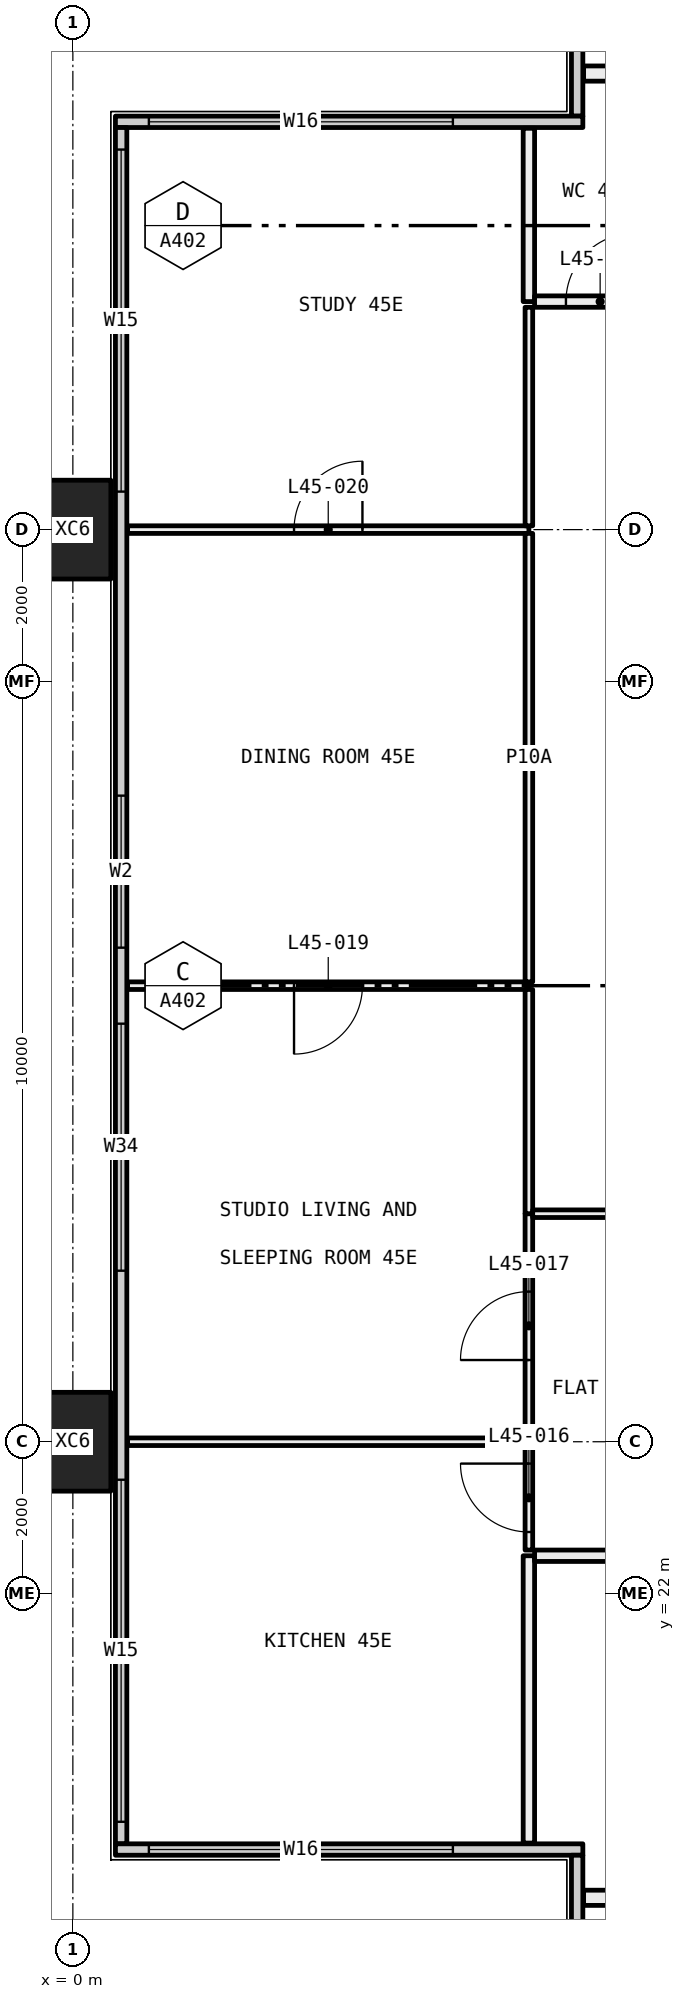
"""IFC4 building model, lengths in metres.
Left out: names, types, materials, properties, quantities, classifications, styles, units other than length and angle.
Written with IfcOpenShell. Run it as: python <this file> out.ifc"""

import sys

from ifc_helpers import new_model, si_unit, direction, frame, frame_2d, origin, origin_2d, place, context, subcontext, project, spatial, rectangle, hollow_rectangle, extrude, element, fill, save


model = new_model("IFC4")
c1 = context("Model", 3, precision=1e-05, world=origin(), true_north=direction((0.0, 1.0)))
c2 = subcontext(c1, "Body", "Model", "MODEL_VIEW")
j1 = project(units=[si_unit("LENGTHUNIT", "METRE"), si_unit("PLANEANGLEUNIT", "RADIAN")], contexts=[c1])
p1 = place(None, origin())
s1 = spatial("IfcSite", under=j1, at=p1, CompositionType="ELEMENT")
p2 = place(p1, origin())
s2 = spatial("IfcBuilding", under=s1, at=p2, CompositionType="ELEMENT")
p3 = place(p2, frame((0.0, 0.0, 172.05)))
s3 = spatial("IfcBuildingStorey", under=s2, at=p3, CompositionType="ELEMENT", Elevation=172.05)
for number, where, z_axis, x_axis in (
    (1, (0.0, 24.0, -0.4), (0.0, 0.0, 1.0), (0.0, 1.0, 0.0)),
    (2, (0.0, 36.0, -0.4), (0.0, 0.0, 1.0), (0.0, 1.0, 0.0)),
):
    element("IfcColumn", number, at=place(p3, frame(where, z_axis=z_axis, x_axis=x_axis)), inside=s3, PredefinedType="COLUMN", context=c2, shape_type="SweptSolid", body=[
        extrude(hollow_rectangle(XDim=1.3, YDim=1.0, WallThickness=0.05, at=origin_2d()), origin(), (0.0, 0.0, 1.0), 3.45),
    ])
p4 = place(p3, frame((6.635, 41.44, 0.0), z_axis=(0.0, 0.0, 1.0), x_axis=(0.0, 1.0, 0.0)))
e3 = element("IfcWall", 3, at=p4, inside=s3, PredefinedType="ELEMENTEDWALL", context=c2, shape_type="SweptSolid", body=[
    extrude(rectangle(XDim=5.85, YDim=0.15, at=frame_2d((2.925, 0.0))), origin(), (0.0, 0.0, 1.0), 3.05),
])
p5 = place(p4, frame((1.56, 0.0, 0.45)))
e4 = element("IfcOpeningElement", 4, at=p5, cuts=e3, PredefinedType="OPENING", context=c2, shape_type="SweptSolid", body=[
    extrude(rectangle(XDim=4.0, YDim=2.55, at=frame_2d((2.0, 1.275))), frame((0.0, 0.085, 0.0), z_axis=(0.0, -1.0, 0.0), x_axis=(1.0, 0.0, 0.0)), (0.0, 0.0, 1.0), 0.17),
])
p6 = place(p3, frame((0.56, 41.365, 0.0), z_axis=(0.0, 0.0, 1.0), x_axis=(1.0, 0.0, 0.0)))
e5 = element("IfcWall", 5, at=p6, inside=s3, PredefinedType="ELEMENTEDWALL", context=c2, shape_type="SweptSolid", body=[
    extrude(rectangle(XDim=6.15, YDim=0.15, at=frame_2d((3.075, 0.0))), origin(), (0.0, 0.0, 1.0), 3.05),
])
p7 = place(p6, frame((0.44, 0.0, 0.45)))
e6 = element("IfcOpeningElement", 6, at=p7, cuts=e5, PredefinedType="OPENING", context=c2, shape_type="SweptSolid", body=[
    extrude(rectangle(XDim=4.0, YDim=2.55, at=frame_2d((2.0, 1.275))), frame((0.0, 0.085, 0.0), z_axis=(0.0, -1.0, 0.0), x_axis=(1.0, 0.0, 0.0)), (0.0, 0.0, 1.0), 0.17),
])
p8 = place(p3, frame((0.635, 18.71, 0.0), z_axis=(0.0, 0.0, 1.0), x_axis=(0.0, 1.0, 0.0)))
e7 = element("IfcWall", 7, at=p8, inside=s3, PredefinedType="ELEMENTEDWALL", context=c2, shape_type="SweptSolid", body=[
    extrude(rectangle(XDim=22.58, YDim=0.15, at=frame_2d((11.29, 0.0))), origin(), (0.0, 0.0, 1.0), 3.05),
])
p9 = place(p8, frame((0.29, 0.0, 0.45)))
e8 = element("IfcOpeningElement", 8, at=p9, cuts=e7, PredefinedType="OPENING", context=c2, shape_type="SweptSolid", body=[
    extrude(rectangle(XDim=4.5, YDim=2.55, at=frame_2d((2.25, 1.275))), frame((0.0, 0.085, 0.0), z_axis=(0.0, -1.0, 0.0), x_axis=(1.0, 0.0, 0.0)), (0.0, 0.0, 1.0), 0.17),
])
p10 = place(p8, frame((7.54, 0.0, 0.45)))
e9 = element("IfcOpeningElement", 9, at=p10, cuts=e7, PredefinedType="OPENING", context=c2, shape_type="SweptSolid", body=[
    extrude(rectangle(XDim=3.25, YDim=2.55, at=frame_2d((1.625, 1.275))), frame((0.0, 0.085, 0.0), z_axis=(0.0, -1.0, 0.0), x_axis=(1.0, 0.0, 0.0)), (0.0, 0.0, 1.0), 0.17),
])
p11 = place(p8, frame((11.79, 0.0, 0.45)))
e10 = element("IfcOpeningElement", 10, at=p11, cuts=e7, PredefinedType="OPENING", context=c2, shape_type="SweptSolid", body=[
    extrude(rectangle(XDim=2.0, YDim=2.55, at=frame_2d((1.0, 1.275))), frame((0.0, 0.085, 0.0), z_axis=(0.0, -1.0, 0.0), x_axis=(1.0, 0.0, 0.0)), (0.0, 0.0, 1.0), 0.17),
])
p12 = place(p8, frame((17.79, 0.0, 0.45)))
e11 = element("IfcOpeningElement", 11, at=p12, cuts=e7, PredefinedType="OPENING", context=c2, shape_type="SweptSolid", body=[
    extrude(rectangle(XDim=4.5, YDim=2.55, at=frame_2d((2.25, 1.275))), frame((0.0, 0.085, 0.0), z_axis=(0.0, -1.0, 0.0), x_axis=(1.0, 0.0, 0.0)), (0.0, 0.0, 1.0), 0.17),
])
p13 = place(p3, frame((0.56, 18.635, 0.0), z_axis=(0.0, 0.0, 1.0), x_axis=(1.0, 0.0, 0.0)))
e12 = element("IfcWall", 12, at=p13, inside=s3, PredefinedType="ELEMENTEDWALL", context=c2, shape_type="SweptSolid", body=[
    extrude(rectangle(XDim=6.15, YDim=0.15, at=frame_2d((3.075, 0.0))), origin(), (0.0, 0.0, 1.0), 3.05),
])
p14 = place(p13, frame((0.44, 0.0, 0.45)))
e13 = element("IfcOpeningElement", 13, at=p14, cuts=e12, PredefinedType="OPENING", context=c2, shape_type="SweptSolid", body=[
    extrude(rectangle(XDim=4.0, YDim=2.55, at=frame_2d((2.0, 1.275))), frame((0.0, 0.085, 0.0), z_axis=(0.0, -1.0, 0.0), x_axis=(1.0, 0.0, 0.0)), (0.0, 0.0, 1.0), 0.17),
])
p15 = place(p3, frame((6.635, 12.71, 0.0), z_axis=(0.0, 0.0, 1.0), x_axis=(0.0, 1.0, 0.0)))
e14 = element("IfcWall", 14, at=p15, inside=s3, PredefinedType="ELEMENTEDWALL", context=c2, shape_type="SweptSolid", body=[
    extrude(rectangle(XDim=5.85, YDim=0.15, at=frame_2d((2.925, 0.0))), origin(), (0.0, 0.0, 1.0), 3.05),
])
p16 = place(p15, frame((0.29, 0.0, 0.45)))
e15 = element("IfcOpeningElement", 15, at=p16, cuts=e14, PredefinedType="OPENING", context=c2, shape_type="SweptSolid", body=[
    extrude(rectangle(XDim=4.0, YDim=2.55, at=frame_2d((2.0, 1.275))), frame((0.0, 0.085, 0.0), z_axis=(0.0, -1.0, 0.0), x_axis=(1.0, 0.0, 0.0)), (0.0, 0.0, 1.0), 0.17),
])
p17 = place(p3, frame((10.1, 18.0, 0.0), z_axis=(0.0, 0.0, 1.0), x_axis=(-1.0, 0.0, 0.0)))
e16 = element("IfcWall", 16, at=p17, inside=s3, PredefinedType="PARTITIONING", context=c2, shape_type="SweptSolid", body=[
    extrude(rectangle(XDim=3.38, YDim=0.2, at=frame_2d((1.69, 0.0))), origin(), (0.0, 0.0, 1.0), 3.05),
])
p18 = place(p3, frame((6.72, 42.0, 0.0), z_axis=(0.0, 0.0, 1.0), x_axis=(1.0, 0.0, 0.0)))
e17 = element("IfcWall", 17, at=p18, inside=s3, PredefinedType="PARTITIONING", context=c2, shape_type="SweptSolid", body=[
    extrude(rectangle(XDim=1.08, YDim=0.2, at=frame_2d((0.54, 0.0))), origin(), (0.0, 0.0, 1.0), 3.05),
])
p19 = place(p3, frame((6.0, 24.0, 0.0), z_axis=(0.0, 0.0, 1.0), x_axis=(-1.0, 0.0, 0.0)))
e18 = element("IfcWall", 18, at=p19, inside=s3, PredefinedType="PARTITIONING", context=c2, shape_type="SweptSolid", body=[
    extrude(rectangle(XDim=5.28, YDim=0.1, at=frame_2d((2.64, 0.0))), origin(), (0.0, 0.0, 1.0), 2.45),
])
p20 = place(p3, frame((6.0, 18.72, 0.0), z_axis=(0.0, 0.0, 1.0), x_axis=(0.0, 1.0, 0.0)))
e19 = element("IfcWall", 19, at=p20, inside=s3, PredefinedType="PARTITIONING", context=c2, shape_type="SweptSolid", body=[
    extrude(rectangle(XDim=3.78, YDim=0.15, at=frame_2d((1.89, 0.0))), origin(), (0.0, 0.0, 1.0), 3.05),
])
p21 = place(p3, frame((6.0, 22.575, 0.0), z_axis=(0.0, 0.0, 1.0), x_axis=(0.0, 1.0, 0.0)))
e20 = element("IfcWall", 20, at=p21, inside=s3, PredefinedType="PARTITIONING", context=c2, shape_type="SweptSolid", body=[
    extrude(rectangle(XDim=1.375, YDim=0.1, at=frame_2d((0.688, 0.0))), origin(), (0.0, 0.0, 1.0), 2.45),
])
p22 = place(p21, frame((0.238, 0.0, 0.0)))
e21 = element("IfcOpeningElement", 21, at=p22, cuts=e20, PredefinedType="OPENING", context=c2, shape_type="SweptSolid", body=[
    extrude(rectangle(XDim=0.9, YDim=2.1, at=frame_2d((0.45, 1.05))), frame((0.0, 0.06, 0.0), z_axis=(0.0, -1.0, 0.0), x_axis=(1.0, 0.0, 0.0)), (0.0, 0.0, 1.0), 0.12),
])
p23 = place(p3, frame((6.0, 30.0, 0.0), z_axis=(0.0, 0.0, 1.0), x_axis=(-1.0, 0.0, 0.0)))
e22 = element("IfcWall", 22, at=p23, inside=s3, PredefinedType="PARTITIONING", context=c2, shape_type="SweptSolid", body=[
    extrude(rectangle(XDim=5.28, YDim=0.1, at=frame_2d((2.64, 0.0))), origin(), (0.0, 0.0, 1.0), 3.05),
])
p24 = place(p23, frame((2.19, 0.0, 0.0)))
e23 = element("IfcOpeningElement", 23, at=p24, cuts=e22, PredefinedType="OPENING", context=c2, shape_type="SweptSolid", body=[
    extrude(rectangle(XDim=0.9, YDim=2.1, at=frame_2d((0.45, 1.05))), frame((0.0, 0.06, 0.0), z_axis=(0.0, -1.0, 0.0), x_axis=(1.0, 0.0, 0.0)), (0.0, 0.0, 1.0), 0.12),
])
p25 = place(p3, frame((6.0, 24.05, 0.0), z_axis=(0.0, 0.0, 1.0), x_axis=(0.0, 1.0, 0.0)))
e24 = element("IfcWall", 24, at=p25, inside=s3, PredefinedType="PARTITIONING", context=c2, shape_type="SweptSolid", body=[
    extrude(rectangle(XDim=2.95, YDim=0.1, at=frame_2d((1.475, 0.0))), origin(), (0.0, 0.0, 1.0), 2.45),
])
p26 = place(p25, frame((1.025, 0.0, 0.0)))
e25 = element("IfcOpeningElement", 25, at=p26, cuts=e24, PredefinedType="OPENING", context=c2, shape_type="SweptSolid", body=[
    extrude(rectangle(XDim=0.9, YDim=2.1, at=frame_2d((0.45, 1.05))), frame((0.0, 0.06, 0.0), z_axis=(0.0, -1.0, 0.0), x_axis=(1.0, 0.0, 0.0)), (0.0, 0.0, 1.0), 0.12),
])
p27 = place(p3, frame((6.0, 27.0, 0.0), z_axis=(0.0, 0.0, 1.0), x_axis=(0.0, 1.0, 0.0)))
e26 = element("IfcWall", 26, at=p27, inside=s3, PredefinedType="PARTITIONING", context=c2, shape_type="SweptSolid", body=[
    extrude(rectangle(XDim=2.95, YDim=0.1, at=frame_2d((1.475, 0.0))), origin(), (0.0, 0.0, 1.0), 3.05),
])
p28 = place(p3, frame((6.0, 36.0, 0.0), z_axis=(0.0, 0.0, 1.0), x_axis=(-1.0, 0.0, 0.0)))
e27 = element("IfcWall", 27, at=p28, inside=s3, PredefinedType="PARTITIONING", context=c2, shape_type="SweptSolid", body=[
    extrude(rectangle(XDim=5.28, YDim=0.1, at=frame_2d((2.64, 0.0))), origin(), (0.0, 0.0, 1.0), 2.45),
])
p29 = place(p28, frame((2.19, 0.0, 0.0)))
e28 = element("IfcOpeningElement", 28, at=p29, cuts=e27, PredefinedType="OPENING", context=c2, shape_type="SweptSolid", body=[
    extrude(rectangle(XDim=0.9, YDim=2.1, at=frame_2d((0.45, 1.05))), frame((0.0, 0.06, 0.0), z_axis=(0.0, -1.0, 0.0), x_axis=(1.0, 0.0, 0.0)), (0.0, 0.0, 1.0), 0.12),
])
p30 = place(p3, frame((6.0, 30.05, 0.0), z_axis=(0.0, 0.0, 1.0), x_axis=(0.0, 1.0, 0.0)))
e29 = element("IfcWall", 29, at=p30, inside=s3, PredefinedType="PARTITIONING", context=c2, shape_type="SweptSolid", body=[
    extrude(rectangle(XDim=5.9, YDim=0.1, at=frame_2d((2.95, 0.0))), origin(), (0.0, 0.0, 1.0), 2.45),
])
p31 = place(p3, frame((6.0, 36.05, 0.0), z_axis=(0.0, 0.0, 1.0), x_axis=(0.0, 1.0, 0.0)))
e30 = element("IfcWall", 30, at=p31, inside=s3, PredefinedType="PARTITIONING", context=c2, shape_type="SweptSolid", body=[
    extrude(rectangle(XDim=2.875, YDim=0.1, at=frame_2d((1.438, 0.0))), origin(), (0.0, 0.0, 1.0), 2.45),
])
p32 = place(p3, frame((6.0, 39.0, 0.0), z_axis=(0.0, 0.0, 1.0), x_axis=(0.0, 1.0, 0.0)))
e31 = element("IfcWall", 31, at=p32, inside=s3, PredefinedType="PARTITIONING", context=c2, shape_type="SweptSolid", body=[
    extrude(rectangle(XDim=2.28, YDim=0.15, at=frame_2d((1.14, 0.0))), origin(), (0.0, 0.0, 1.0), 3.05),
])
p33 = place(p3, frame((10.0, 22.5, 0.0), z_axis=(0.0, 0.0, 1.0), x_axis=(-1.0, 0.0, 0.0)))
e32 = element("IfcWall", 32, at=p33, inside=s3, PredefinedType="PARTITIONING", context=c2, shape_type="SweptSolid", body=[
    extrude(rectangle(XDim=3.925, YDim=0.15, at=frame_2d((1.962, 0.0))), origin(), (0.0, 0.0, 1.0), 3.05),
])
p34 = place(p33, frame((1.512, 0.0, 0.0)))
e33 = element("IfcOpeningElement", 33, at=p34, cuts=e32, PredefinedType="OPENING", context=c2, shape_type="SweptSolid", body=[
    extrude(rectangle(XDim=0.9, YDim=2.1, at=frame_2d((0.45, 1.05))), frame((0.0, 0.085, 0.0), z_axis=(0.0, -1.0, 0.0), x_axis=(1.0, 0.0, 0.0)), (0.0, 0.0, 1.0), 0.17),
])
p35 = place(p3, frame((10.0, 27.0, 0.0), z_axis=(0.0, 0.0, 1.0), x_axis=(-1.0, 0.0, 0.0)))
e34 = element("IfcWall", 34, at=p35, inside=s3, PredefinedType="PARTITIONING", context=c2, shape_type="SweptSolid", body=[
    extrude(rectangle(XDim=3.95, YDim=0.1, at=frame_2d((1.975, 0.0))), origin(), (0.0, 0.0, 1.0), 3.05),
])
p36 = place(p35, frame((1.525, 0.0, 0.0)))
e35 = element("IfcOpeningElement", 35, at=p36, cuts=e34, PredefinedType="OPENING", context=c2, shape_type="SweptSolid", body=[
    extrude(rectangle(XDim=0.9, YDim=2.1, at=frame_2d((0.45, 1.05))), frame((0.0, 0.06, 0.0), z_axis=(0.0, -1.0, 0.0), x_axis=(1.0, 0.0, 0.0)), (0.0, 0.0, 1.0), 0.12),
])
p37 = place(p3, frame((7.8, 39.0, 0.0), z_axis=(0.0, 0.0, 1.0), x_axis=(-1.0, 0.0, 0.0)))
e36 = element("IfcWall", 36, at=p37, inside=s3, PredefinedType="PARTITIONING", context=c2, shape_type="SweptSolid", body=[
    extrude(rectangle(XDim=1.725, YDim=0.15, at=frame_2d((0.863, 0.0))), origin(), (0.0, 0.0, 1.0), 3.05),
])
p38 = place(p37, frame((0.413, 0.0, 0.0)))
e37 = element("IfcOpeningElement", 37, at=p38, cuts=e36, PredefinedType="OPENING", context=c2, shape_type="SweptSolid", body=[
    extrude(rectangle(XDim=0.9, YDim=2.1, at=frame_2d((0.45, 1.05))), frame((0.0, 0.085, 0.0), z_axis=(0.0, -1.0, 0.0), x_axis=(1.0, 0.0, 0.0)), (0.0, 0.0, 1.0), 0.17),
])
p39 = place(p7, origin())
e38 = element("IfcWindow", 38, at=p39, inside=s3, PartitioningType="SINGLE_PANEL", PredefinedType="WINDOW", context=c2, shape_type="SweptSolid", body=[
    extrude(rectangle(XDim=4.0, YDim=2.55, at=frame_2d((2.0, 1.275))), frame((0.0, 0.03, 0.0), z_axis=(0.0, -1.0, 0.0), x_axis=(1.0, 0.0, 0.0)), (0.0, 0.0, 1.0), 0.06),
])
fill(e6, e38)
p40 = place(p9, origin())
e39 = element("IfcWindow", 39, at=p40, inside=s3, PartitioningType="SINGLE_PANEL", PredefinedType="WINDOW", context=c2, shape_type="SweptSolid", body=[
    extrude(rectangle(XDim=4.5, YDim=2.55, at=frame_2d((2.25, 1.275))), frame((0.0, 0.03, 0.0), z_axis=(0.0, -1.0, 0.0), x_axis=(1.0, 0.0, 0.0)), (0.0, 0.0, 1.0), 0.06),
])
fill(e8, e39)
p41 = place(p10, origin())
e40 = element("IfcWindow", 40, at=p41, inside=s3, PartitioningType="SINGLE_PANEL", PredefinedType="WINDOW", context=c2, shape_type="SweptSolid", body=[
    extrude(rectangle(XDim=3.25, YDim=2.55, at=frame_2d((1.625, 1.275))), frame((0.0, 0.03, 0.0), z_axis=(0.0, -1.0, 0.0), x_axis=(1.0, 0.0, 0.0)), (0.0, 0.0, 1.0), 0.06),
])
fill(e9, e40)
p42 = place(p11, origin())
e41 = element("IfcWindow", 41, at=p42, inside=s3, PartitioningType="SINGLE_PANEL", PredefinedType="WINDOW", context=c2, shape_type="SweptSolid", body=[
    extrude(rectangle(XDim=2.0, YDim=2.55, at=frame_2d((1.0, 1.275))), frame((0.0, 0.03, 0.0), z_axis=(0.0, -1.0, 0.0), x_axis=(1.0, 0.0, 0.0)), (0.0, 0.0, 1.0), 0.06),
])
fill(e10, e41)
p43 = place(p12, origin())
e42 = element("IfcWindow", 42, at=p43, inside=s3, PartitioningType="SINGLE_PANEL", PredefinedType="WINDOW", context=c2, shape_type="SweptSolid", body=[
    extrude(rectangle(XDim=4.5, YDim=2.55, at=frame_2d((2.25, 1.275))), frame((0.0, 0.03, 0.0), z_axis=(0.0, -1.0, 0.0), x_axis=(1.0, 0.0, 0.0)), (0.0, 0.0, 1.0), 0.06),
])
fill(e11, e42)
p44 = place(p14, origin())
e43 = element("IfcWindow", 43, at=p44, inside=s3, PartitioningType="SINGLE_PANEL", PredefinedType="WINDOW", context=c2, shape_type="SweptSolid", body=[
    extrude(rectangle(XDim=4.0, YDim=2.55, at=frame_2d((2.0, 1.275))), frame((0.0, 0.03, 0.0), z_axis=(0.0, -1.0, 0.0), x_axis=(1.0, 0.0, 0.0)), (0.0, 0.0, 1.0), 0.06),
])
fill(e13, e43)
p45 = place(p22, origin())
e44 = element("IfcDoor", 44, at=p45, inside=s3, OperationType="SINGLE_SWING_LEFT", PredefinedType="DOOR", context=c2, shape_type="SweptSolid", body=[
    extrude(rectangle(XDim=0.9, YDim=2.1, at=frame_2d((0.45, 1.05))), frame((0.0, 0.025, 0.0), z_axis=(0.0, -1.0, 0.0), x_axis=(1.0, 0.0, 0.0)), (0.0, 0.0, 1.0), 0.05),
])
fill(e21, e44)
p46 = place(p26, origin())
e45 = element("IfcDoor", 45, at=p46, inside=s3, OperationType="SINGLE_SWING_RIGHT", PredefinedType="DOOR", context=c2, shape_type="SweptSolid", body=[
    extrude(rectangle(XDim=0.9, YDim=2.1, at=frame_2d((0.45, 1.05))), frame((0.0, 0.025, 0.0), z_axis=(0.0, -1.0, 0.0), x_axis=(1.0, 0.0, 0.0)), (0.0, 0.0, 1.0), 0.05),
])
fill(e25, e45)
p47 = place(p24, origin())
e46 = element("IfcDoor", 46, at=p47, inside=s3, OperationType="SINGLE_SWING_LEFT", PredefinedType="DOOR", context=c2, shape_type="SweptSolid", body=[
    extrude(rectangle(XDim=0.9, YDim=2.1, at=frame_2d((0.45, 1.05))), frame((0.0, 0.025, 0.0), z_axis=(0.0, -1.0, 0.0), x_axis=(1.0, 0.0, 0.0)), (0.0, 0.0, 1.0), 0.05),
])
fill(e23, e46)
p48 = place(p29, frame((0.9, 0.0, 0.0), x_axis=(-1.0, 0.0, 0.0)))
e47 = element("IfcDoor", 47, at=p48, inside=s3, OperationType="SINGLE_SWING_LEFT", PredefinedType="DOOR", context=c2, shape_type="SweptSolid", body=[
    extrude(rectangle(XDim=0.9, YDim=2.1, at=frame_2d((0.45, 1.05))), frame((0.0, 0.025, 0.0), z_axis=(0.0, -1.0, 0.0), x_axis=(1.0, 0.0, 0.0)), (0.0, 0.0, 1.0), 0.05),
])
fill(e28, e47)
p49 = place(p38, frame((0.9, 0.0, 0.0), x_axis=(-1.0, 0.0, 0.0)))
e48 = element("IfcDoor", 48, at=p49, inside=s3, OperationType="SINGLE_SWING_LEFT", PredefinedType="DOOR", context=c2, shape_type="SweptSolid", body=[
    extrude(rectangle(XDim=0.9, YDim=2.1, at=frame_2d((0.45, 1.05))), frame((0.0, 0.025, 0.0), z_axis=(0.0, -1.0, 0.0), x_axis=(1.0, 0.0, 0.0)), (0.0, 0.0, 1.0), 0.05),
])
fill(e37, e48)
save(model, sys.argv[1])
